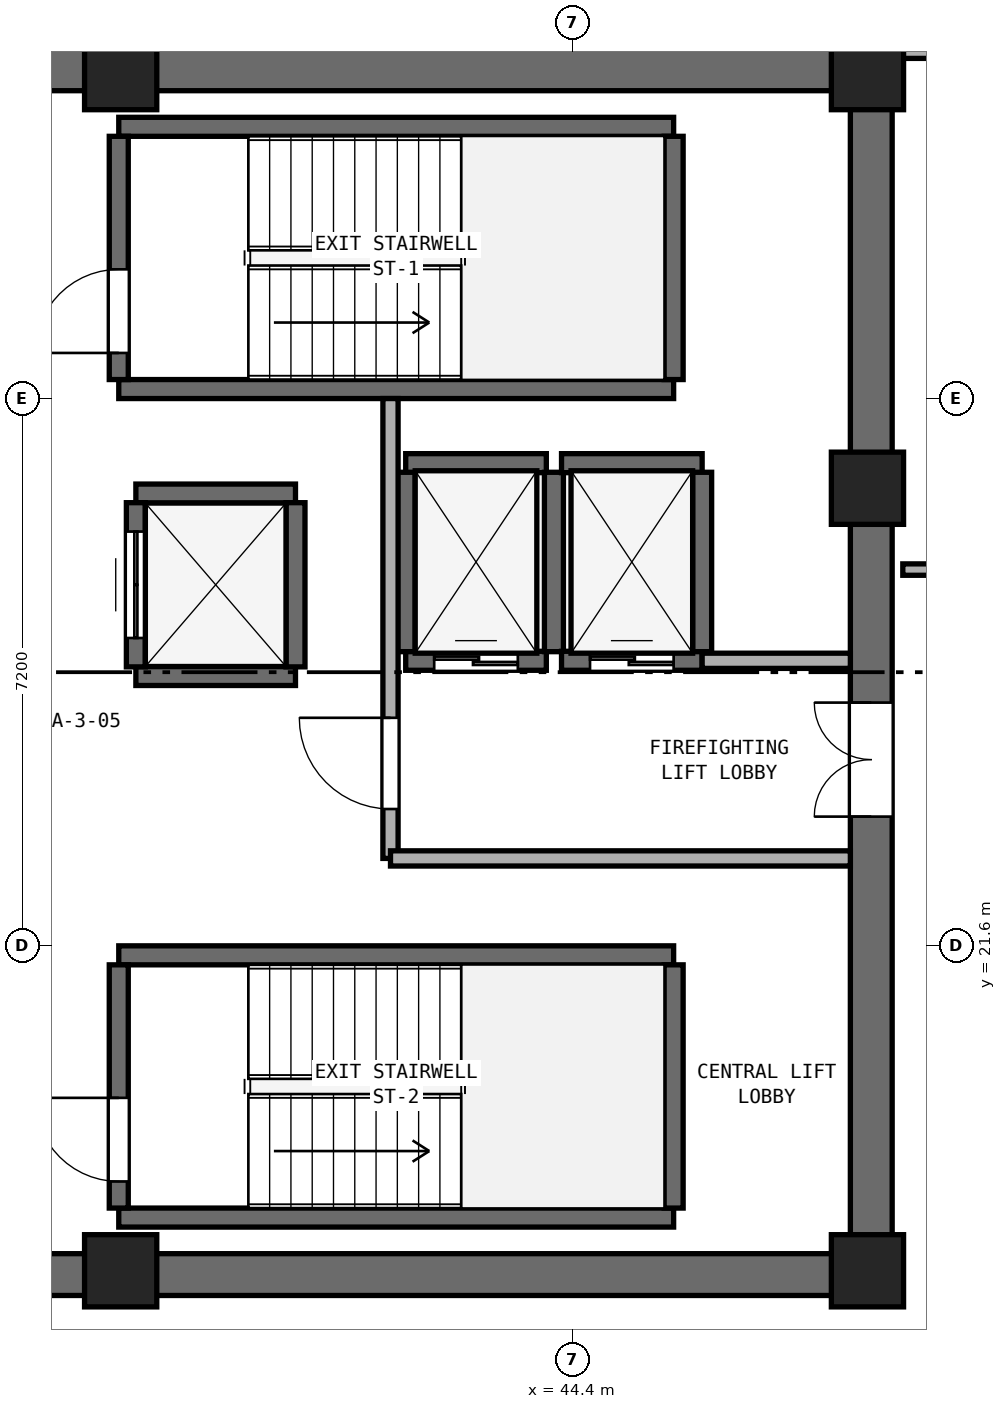
"""IFC4 building model, lengths in metres.
Left out: names, types, materials, properties, quantities, classifications, styles, units other than length and angle.
Written with IfcOpenShell. Run it as: python <this file> out.ifc"""

import sys

from ifc_helpers import new_model, si_unit, direction, frame, frame_2d, origin, origin_2d, place, context, subcontext, project, spatial, rectangle, extrude, element, fill, save


model = new_model("IFC4")
c1 = context("Model", 3, precision=1e-05, world=origin(), true_north=direction((0.0, 1.0)))
c2 = subcontext(c1, "Body", "Model", "MODEL_VIEW")
j1 = project(units=[si_unit("LENGTHUNIT", "METRE"), si_unit("PLANEANGLEUNIT", "RADIAN")], contexts=[c1])
p1 = place(None, origin())
s1 = spatial("IfcSite", under=j1, at=p1, CompositionType="ELEMENT")
p2 = place(p1, origin())
s2 = spatial("IfcBuilding", under=s1, at=p2, CompositionType="ELEMENT")
p3 = place(p2, frame((0.0, 0.0, 136.4)))
s3 = spatial("IfcBuildingStorey", under=s2, at=p3, CompositionType="ELEMENT", Elevation=136.4)
for number, where, z_axis, x_axis in (
    (1, (25.4, 17.275, 0.0), (0.0, 0.0, 1.0), (1.0, 0.0, 0.0)),
    (2, (25.4, 33.125, 0.0), (0.0, 0.0, 1.0), (1.0, 0.0, 0.0)),
):
    element("IfcWall", number, at=place(p3, frame(where, z_axis=z_axis, x_axis=x_axis)), inside=s3, PredefinedType="SHEAR", context=c2, shape_type="SweptSolid", body=[
        extrude(rectangle(XDim=23.2, YDim=0.55, at=frame_2d((11.6, 0.0))), origin(), (0.0, 0.0, 1.0), 3.54),
    ])
p4 = place(p3, frame((48.325, 17.55, 0.0), z_axis=(0.0, 0.0, 1.0), x_axis=(0.0, 1.0, 0.0)))
e3 = element("IfcWall", 3, at=p4, inside=s3, PredefinedType="SHEAR", context=c2, shape_type="SweptSolid", body=[
    extrude(rectangle(XDim=15.3, YDim=0.55, at=frame_2d((7.65, 0.0))), origin(), (0.0, 0.0, 1.0), 3.54),
])
p5 = place(p4, frame((5.75, 0.0, 0.0)))
e4 = element("IfcOpeningElement", 4, at=p5, cuts=e3, PredefinedType="OPENING", context=c2, shape_type="SweptSolid", body=[
    extrude(rectangle(XDim=1.5, YDim=2.15, at=frame_2d((0.75, 1.075))), frame((0.0, 0.285, 0.0), z_axis=(0.0, -1.0, 0.0), x_axis=(1.0, 0.0, 0.0)), (0.0, 0.0, 1.0), 0.57),
])
for number, where, z_axis, x_axis in (
    (5, (38.45, 17.325, 0.0), (0.0, 0.0, 1.0), (1.0, 0.0, 0.0)),
    (6, (48.275, 17.325, 0.0), (0.0, 0.0, 1.0), (1.0, 0.0, 0.0)),
    (7, (48.275, 27.62, 0.0), (0.0, 0.0, 1.0), (1.0, 0.0, 0.0)),
    (8, (48.275, 33.075, 0.0), (0.0, 0.0, 1.0), (1.0, 0.0, 0.0)),
    (9, (38.45, 33.075, 0.0), (0.0, 0.0, 1.0), (1.0, 0.0, 0.0)),
):
    element("IfcColumn", number, at=place(p3, frame(where, z_axis=z_axis, x_axis=x_axis)), inside=s3, PredefinedType="PILASTER", context=c2, shape_type="SweptSolid", body=[
        extrude(rectangle(XDim=0.95, YDim=0.95, at=origin_2d()), origin(), (0.0, 0.0, 1.0), 3.8),
    ])
for number, where, z_axis, x_axis in (
    (10, (38.425, 28.925, 0.0), (0.0, 0.0, 1.0), (1.0, 0.0, 0.0)),
    (11, (38.425, 32.375, 0.0), (0.0, 0.0, 1.0), (1.0, 0.0, 0.0)),
):
    element("IfcWall", number, at=place(p3, frame(where, z_axis=z_axis, x_axis=x_axis)), inside=s3, PredefinedType="SHEAR", context=c2, shape_type="SweptSolid", body=[
        extrude(rectangle(XDim=7.3, YDim=0.25, at=frame_2d((3.65, 0.0))), origin(), (0.0, 0.0, 1.0), 3.54),
    ])
p6 = place(p3, frame((38.425, 29.05, 0.0), z_axis=(0.0, 0.0, 1.0), x_axis=(0.0, 1.0, 0.0)))
e12 = element("IfcWall", 12, at=p6, inside=s3, PredefinedType="SHEAR", context=c2, shape_type="SweptSolid", body=[
    extrude(rectangle(XDim=3.2, YDim=0.25, at=frame_2d((1.6, 0.0))), origin(), (0.0, 0.0, 1.0), 3.54),
])
p7 = place(p6, frame((0.35, 0.0, 0.0)))
e13 = element("IfcOpeningElement", 13, at=p7, cuts=e12, PredefinedType="OPENING", context=c2, shape_type="SweptSolid", body=[
    extrude(rectangle(XDim=1.1, YDim=2.15, at=frame_2d((0.55, 1.075))), frame((0.0, 0.135, 0.0), z_axis=(0.0, -1.0, 0.0), x_axis=(1.0, 0.0, 0.0)), (0.0, 0.0, 1.0), 0.27),
])
p8 = place(p3, frame((45.725, 29.05, 0.0), z_axis=(0.0, 0.0, 1.0), x_axis=(0.0, 1.0, 0.0)))
e14 = element("IfcWall", 14, at=p8, inside=s3, PredefinedType="SHEAR", context=c2, shape_type="SweptSolid", body=[
    extrude(rectangle(XDim=3.2, YDim=0.25, at=frame_2d((1.6, 0.0))), origin(), (0.0, 0.0, 1.0), 3.54),
])
for number, where, z_axis, x_axis in (
    (15, (38.425, 18.025, 0.0), (0.0, 0.0, 1.0), (1.0, 0.0, 0.0)),
    (16, (38.425, 21.475, 0.0), (0.0, 0.0, 1.0), (1.0, 0.0, 0.0)),
):
    element("IfcWall", number, at=place(p3, frame(where, z_axis=z_axis, x_axis=x_axis)), inside=s3, PredefinedType="SHEAR", context=c2, shape_type="SweptSolid", body=[
        extrude(rectangle(XDim=7.3, YDim=0.25, at=frame_2d((3.65, 0.0))), origin(), (0.0, 0.0, 1.0), 3.54),
    ])
p9 = place(p3, frame((38.425, 18.15, 0.0), z_axis=(0.0, 0.0, 1.0), x_axis=(0.0, 1.0, 0.0)))
e17 = element("IfcWall", 17, at=p9, inside=s3, PredefinedType="SHEAR", context=c2, shape_type="SweptSolid", body=[
    extrude(rectangle(XDim=3.2, YDim=0.25, at=frame_2d((1.6, 0.0))), origin(), (0.0, 0.0, 1.0), 3.54),
])
p10 = place(p9, frame((0.35, 0.0, 0.0)))
e18 = element("IfcOpeningElement", 18, at=p10, cuts=e17, PredefinedType="OPENING", context=c2, shape_type="SweptSolid", body=[
    extrude(rectangle(XDim=1.1, YDim=2.15, at=frame_2d((0.55, 1.075))), frame((0.0, 0.135, 0.0), z_axis=(0.0, -1.0, 0.0), x_axis=(1.0, 0.0, 0.0)), (0.0, 0.0, 1.0), 0.27),
])
p11 = place(p3, frame((45.725, 18.15, 0.0), z_axis=(0.0, 0.0, 1.0), x_axis=(0.0, 1.0, 0.0)))
e19 = element("IfcWall", 19, at=p11, inside=s3, PredefinedType="SHEAR", context=c2, shape_type="SweptSolid", body=[
    extrude(rectangle(XDim=3.2, YDim=0.25, at=frame_2d((1.6, 0.0))), origin(), (0.0, 0.0, 1.0), 3.54),
])
p12 = place(p3, frame((42.2, 25.35, 0.0), z_axis=(0.0, 0.0, 1.0), x_axis=(1.0, 0.0, 0.0)))
e20 = element("IfcWall", 20, at=p12, inside=s3, PredefinedType="SHEAR", context=c2, shape_type="SweptSolid", body=[
    extrude(rectangle(XDim=1.85, YDim=0.25, at=frame_2d((0.925, 0.0))), origin(), (0.0, 0.0, 1.0), 3.54),
])
p13 = place(p12, frame((0.375, 0.0, 0.0)))
e21 = element("IfcOpeningElement", 21, at=p13, cuts=e20, PredefinedType="OPENING", context=c2, shape_type="SweptSolid", body=[
    extrude(rectangle(XDim=1.1, YDim=2.15, at=frame_2d((0.55, 1.075))), frame((0.0, 0.135, 0.0), z_axis=(0.0, -1.0, 0.0), x_axis=(1.0, 0.0, 0.0)), (0.0, 0.0, 1.0), 0.27),
])
p14 = place(p3, frame((42.2, 27.95, 0.0), z_axis=(0.0, 0.0, 1.0), x_axis=(1.0, 0.0, 0.0)))
e22 = element("IfcWall", 22, at=p14, inside=s3, PredefinedType="SHEAR", context=c2, shape_type="SweptSolid", body=[
    extrude(rectangle(XDim=1.85, YDim=0.25, at=frame_2d((0.925, 0.0))), origin(), (0.0, 0.0, 1.0), 3.54),
])
for number, where, z_axis, x_axis in (
    (23, (42.2, 25.47, 0.0), (0.0, 0.0, 1.0), (0.0, 1.0, 0.0)),
    (24, (44.15, 25.47, 0.0), (0.0, 0.0, 1.0), (0.0, 1.0, 0.0)),
):
    element("IfcWall", number, at=place(p3, frame(where, z_axis=z_axis, x_axis=x_axis)), inside=s3, PredefinedType="SHEAR", context=c2, shape_type="SweptSolid", body=[
        extrude(rectangle(XDim=2.36, YDim=0.25, at=frame_2d((1.18, 0.0))), origin(), (0.0, 0.0, 1.0), 3.54),
    ])
p15 = place(p3, frame((44.25, 25.35, 0.0), z_axis=(0.0, 0.0, 1.0), x_axis=(1.0, 0.0, 0.0)))
e25 = element("IfcWall", 25, at=p15, inside=s3, PredefinedType="SHEAR", context=c2, shape_type="SweptSolid", body=[
    extrude(rectangle(XDim=1.85, YDim=0.25, at=frame_2d((0.925, 0.0))), origin(), (0.0, 0.0, 1.0), 3.54),
])
p16 = place(p15, frame((0.375, 0.0, 0.0)))
e26 = element("IfcOpeningElement", 26, at=p16, cuts=e25, PredefinedType="OPENING", context=c2, shape_type="SweptSolid", body=[
    extrude(rectangle(XDim=1.1, YDim=2.15, at=frame_2d((0.55, 1.075))), frame((0.0, 0.135, 0.0), z_axis=(0.0, -1.0, 0.0), x_axis=(1.0, 0.0, 0.0)), (0.0, 0.0, 1.0), 0.27),
])
p17 = place(p3, frame((44.25, 27.95, 0.0), z_axis=(0.0, 0.0, 1.0), x_axis=(1.0, 0.0, 0.0)))
e27 = element("IfcWall", 27, at=p17, inside=s3, PredefinedType="SHEAR", context=c2, shape_type="SweptSolid", body=[
    extrude(rectangle(XDim=1.85, YDim=0.25, at=frame_2d((0.925, 0.0))), origin(), (0.0, 0.0, 1.0), 3.54),
])
p18 = place(p3, frame((46.1, 25.47, 0.0), z_axis=(0.0, 0.0, 1.0), x_axis=(0.0, 1.0, 0.0)))
e28 = element("IfcWall", 28, at=p18, inside=s3, PredefinedType="SHEAR", context=c2, shape_type="SweptSolid", body=[
    extrude(rectangle(XDim=2.36, YDim=0.25, at=frame_2d((1.18, 0.0))), origin(), (0.0, 0.0, 1.0), 3.54),
])
for number, where, z_axis, x_axis in (
    (29, (38.65, 25.15, 0.0), (0.0, 0.0, 1.0), (1.0, 0.0, 0.0)),
    (30, (38.65, 27.55, 0.0), (0.0, 0.0, 1.0), (1.0, 0.0, 0.0)),
):
    element("IfcWall", number, at=place(p3, frame(where, z_axis=z_axis, x_axis=x_axis)), inside=s3, PredefinedType="SHEAR", context=c2, shape_type="SweptSolid", body=[
        extrude(rectangle(XDim=2.1, YDim=0.25, at=frame_2d((1.05, 0.0))), origin(), (0.0, 0.0, 1.0), 3.54),
    ])
p19 = place(p3, frame((38.65, 25.27, 0.0), z_axis=(0.0, 0.0, 1.0), x_axis=(0.0, 1.0, 0.0)))
e31 = element("IfcWall", 31, at=p19, inside=s3, PredefinedType="SHEAR", context=c2, shape_type="SweptSolid", body=[
    extrude(rectangle(XDim=2.16, YDim=0.25, at=frame_2d((1.08, 0.0))), origin(), (0.0, 0.0, 1.0), 3.54),
])
p20 = place(p19, frame((0.38, 0.0, 0.0)))
e32 = element("IfcOpeningElement", 32, at=p20, cuts=e31, PredefinedType="OPENING", context=c2, shape_type="SweptSolid", body=[
    extrude(rectangle(XDim=1.4, YDim=2.2, at=frame_2d((0.7, 1.1))), frame((0.0, 0.135, 0.0), z_axis=(0.0, -1.0, 0.0), x_axis=(1.0, 0.0, 0.0)), (0.0, 0.0, 1.0), 0.27),
])
p21 = place(p3, frame((40.75, 25.27, 0.0), z_axis=(0.0, 0.0, 1.0), x_axis=(0.0, 1.0, 0.0)))
e33 = element("IfcWall", 33, at=p21, inside=s3, PredefinedType="SHEAR", context=c2, shape_type="SweptSolid", body=[
    extrude(rectangle(XDim=2.16, YDim=0.25, at=frame_2d((1.08, 0.0))), origin(), (0.0, 0.0, 1.0), 3.54),
])
p22 = place(p3, frame((42.0, 22.75, 0.0), z_axis=(0.0, 0.0, 1.0), x_axis=(0.0, 1.0, 0.0)))
e34 = element("IfcWall", 34, at=p22, inside=s3, PredefinedType="SOLIDWALL", context=c2, shape_type="SweptSolid", body=[
    extrude(rectangle(XDim=6.05, YDim=0.2, at=frame_2d((3.025, 0.0))), origin(), (0.0, 0.0, 1.0), 3.54),
])
p23 = place(p22, frame((0.65, 0.0, 0.0)))
e35 = element("IfcOpeningElement", 35, at=p23, cuts=e34, PredefinedType="OPENING", context=c2, shape_type="SweptSolid", body=[
    extrude(rectangle(XDim=1.2, YDim=2.15, at=frame_2d((0.6, 1.075))), frame((0.0, 0.11, 0.0), z_axis=(0.0, -1.0, 0.0), x_axis=(1.0, 0.0, 0.0)), (0.0, 0.0, 1.0), 0.22),
])
p24 = place(p3, frame((42.0, 22.75, 0.0), z_axis=(0.0, 0.0, 1.0), x_axis=(1.0, 0.0, 0.0)))
e36 = element("IfcWall", 36, at=p24, inside=s3, PredefinedType="SOLIDWALL", context=c2, shape_type="SweptSolid", body=[
    extrude(rectangle(XDim=6.05, YDim=0.2, at=frame_2d((3.025, 0.0))), origin(), (0.0, 0.0, 1.0), 3.54),
])
p25 = place(p3, frame((46.1, 25.35, 0.0), z_axis=(0.0, 0.0, 1.0), x_axis=(1.0, 0.0, 0.0)))
e37 = element("IfcWall", 37, at=p25, inside=s3, PredefinedType="SOLIDWALL", context=c2, shape_type="SweptSolid", body=[
    extrude(rectangle(XDim=1.95, YDim=0.2, at=frame_2d((0.975, 0.0))), origin(), (0.0, 0.0, 1.0), 3.54),
])
p26 = place(p3, frame((48.74, 26.55, 0.0), z_axis=(0.0, 0.0, 1.0), x_axis=(1.0, 0.0, 0.0)))
e38 = element("IfcWall", 38, at=p26, inside=s3, PredefinedType="PARTITIONING", context=c2, shape_type="SweptSolid", body=[
    extrude(rectangle(XDim=14.255, YDim=0.15, at=frame_2d((7.127, 0.0))), origin(), (0.0, 0.0, 1.0), 3.54),
])
p27 = place(p26, frame((6.627, 0.0, 0.0)))
e39 = element("IfcOpeningElement", 39, at=p27, cuts=e38, PredefinedType="OPENING", context=c2, shape_type="SweptSolid", body=[
    extrude(rectangle(XDim=1.0, YDim=2.12, at=frame_2d((0.5, 1.06))), frame((0.0, 0.085, 0.0), z_axis=(0.0, -1.0, 0.0), x_axis=(1.0, 0.0, 0.0)), (0.0, 0.0, 1.0), 0.17),
])
p28 = place(p3, frame((48.74, 33.35, 0.0), z_axis=(0.0, 0.0, 1.0), x_axis=(1.0, 0.0, 0.0)))
e40 = element("IfcWall", 40, at=p28, inside=s3, PredefinedType="PARTITIONING", context=c2, shape_type="SweptSolid", body=[
    extrude(rectangle(XDim=14.255, YDim=0.15, at=frame_2d((7.127, 0.0))), origin(), (0.0, 0.0, 1.0), 2.923),
])
p29 = place(p7, origin())
e41 = element("IfcDoor", 41, at=p29, inside=s3, OperationType="SINGLE_SWING_LEFT", PredefinedType="DOOR", context=c2, shape_type="SweptSolid", body=[
    extrude(rectangle(XDim=1.1, YDim=2.15, at=frame_2d((0.55, 1.075))), frame((0.0, 0.025, 0.0), z_axis=(0.0, -1.0, 0.0), x_axis=(1.0, 0.0, 0.0)), (0.0, 0.0, 1.0), 0.05),
])
fill(e13, e41)
p30 = place(p10, origin())
e42 = element("IfcDoor", 42, at=p30, inside=s3, OperationType="SINGLE_SWING_RIGHT", PredefinedType="DOOR", context=c2, shape_type="SweptSolid", body=[
    extrude(rectangle(XDim=1.1, YDim=2.15, at=frame_2d((0.55, 1.075))), frame((0.0, 0.025, 0.0), z_axis=(0.0, -1.0, 0.0), x_axis=(1.0, 0.0, 0.0)), (0.0, 0.0, 1.0), 0.05),
])
fill(e18, e42)
p31 = place(p13, origin())
e43 = element("IfcDoor", 43, at=p31, inside=s3, OperationType="DOUBLE_DOOR_SLIDING", PredefinedType="DOOR", context=c2, shape_type="SweptSolid", body=[
    extrude(rectangle(XDim=1.1, YDim=2.15, at=frame_2d((0.55, 1.075))), frame((0.0, 0.025, 0.0), z_axis=(0.0, -1.0, 0.0), x_axis=(1.0, 0.0, 0.0)), (0.0, 0.0, 1.0), 0.05),
])
fill(e21, e43)
p32 = place(p16, origin())
e44 = element("IfcDoor", 44, at=p32, inside=s3, OperationType="DOUBLE_DOOR_SLIDING", PredefinedType="DOOR", context=c2, shape_type="SweptSolid", body=[
    extrude(rectangle(XDim=1.1, YDim=2.15, at=frame_2d((0.55, 1.075))), frame((0.0, 0.025, 0.0), z_axis=(0.0, -1.0, 0.0), x_axis=(1.0, 0.0, 0.0)), (0.0, 0.0, 1.0), 0.05),
])
fill(e26, e44)
p33 = place(p20, origin())
e45 = element("IfcDoor", 45, at=p33, inside=s3, OperationType="DOUBLE_DOOR_SLIDING", PredefinedType="DOOR", context=c2, shape_type="SweptSolid", body=[
    extrude(rectangle(XDim=1.4, YDim=2.2, at=frame_2d((0.7, 1.1))), frame((0.0, 0.025, 0.0), z_axis=(0.0, -1.0, 0.0), x_axis=(1.0, 0.0, 0.0)), (0.0, 0.0, 1.0), 0.05),
])
fill(e32, e45)
p34 = place(p23, origin())
e46 = element("IfcDoor", 46, at=p34, inside=s3, OperationType="SINGLE_SWING_RIGHT", PredefinedType="DOOR", context=c2, shape_type="SweptSolid", body=[
    extrude(rectangle(XDim=1.2, YDim=2.15, at=frame_2d((0.6, 1.075))), frame((0.0, 0.025, 0.0), z_axis=(0.0, -1.0, 0.0), x_axis=(1.0, 0.0, 0.0)), (0.0, 0.0, 1.0), 0.05),
])
fill(e35, e46)
p35 = place(p5, origin())
e47 = element("IfcDoor", 47, at=p35, inside=s3, OperationType="DOUBLE_DOOR_SINGLE_SWING", PredefinedType="DOOR", context=c2, shape_type="SweptSolid", body=[
    extrude(rectangle(XDim=1.5, YDim=2.15, at=frame_2d((0.75, 1.075))), frame((0.0, 0.025, 0.0), z_axis=(0.0, -1.0, 0.0), x_axis=(1.0, 0.0, 0.0)), (0.0, 0.0, 1.0), 0.05),
])
fill(e4, e47)
save(model, sys.argv[1])
